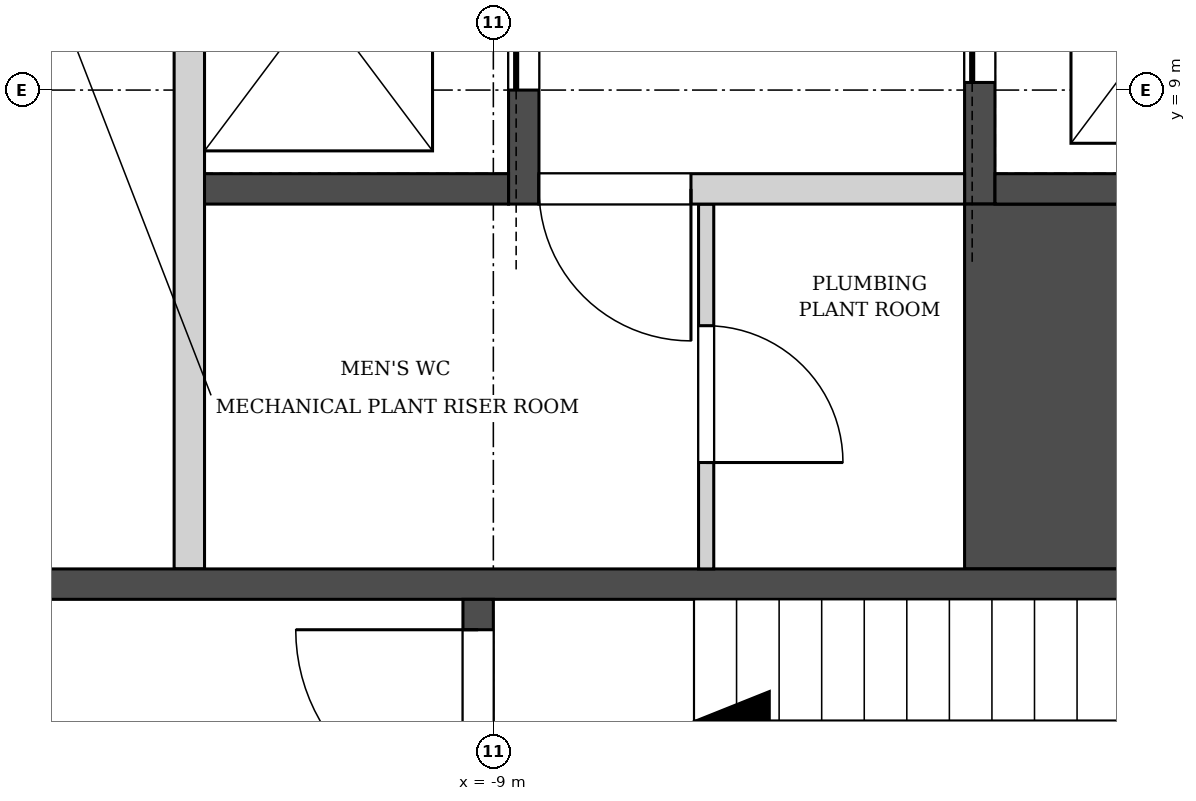
"""IFC4 building model, lengths in metres.
Left out: names, types, materials, properties, quantities, classifications, styles, units other than length and angle.
Written with IfcOpenShell. Run it as: python <this file> out.ifc"""

import sys

from ifc_helpers import new_model, si_unit, direction, frame, frame_2d, origin, place, context, subcontext, project, spatial, rectangle, extrude, element, fill, save


model = new_model("IFC4")
c1 = context("Model", 3, precision=1e-05, world=origin(), true_north=direction((0.0, 1.0)))
c2 = subcontext(c1, "Body", "Model", "MODEL_VIEW")
j1 = project(units=[si_unit("LENGTHUNIT", "METRE"), si_unit("PLANEANGLEUNIT", "RADIAN")], contexts=[c1])
p1 = place(None, origin())
s1 = spatial("IfcSite", under=j1, at=p1, CompositionType="ELEMENT")
p2 = place(p1, origin())
s2 = spatial("IfcBuilding", under=s1, at=p2, CompositionType="ELEMENT")
p3 = place(p2, frame((0.0, 0.0, 132.1)))
s3 = spatial("IfcBuildingStorey", under=s2, at=p3, CompositionType="ELEMENT", Elevation=132.1)
p4 = place(p3, frame((-4.353, 51.692, 0.0), z_axis=(0.0, 0.0, 1.0), x_axis=(-0.500000700546, -0.866024999324, 0.0)))
e1 = element("IfcWall", 1, at=p4, inside=s3, PredefinedType="SOLIDWALL", context=c2, shape_type="SweptSolid", body=[
    extrude(rectangle(XDim=50.787, YDim=0.34, at=frame_2d((25.393, 0.0))), origin(), (0.0, 0.0, 1.0), 5.0),
])
p5 = place(p4, frame((3.59, 0.0, 0.9)))
e2 = element("IfcOpeningElement", 2, at=p5, cuts=e1, PredefinedType="OPENING", context=c2, shape_type="SweptSolid", body=[
    extrude(rectangle(XDim=1.885, YDim=3.0, at=frame_2d((0.942, 1.5))), frame((0.0, 0.18, 0.0), z_axis=(0.0, -1.0, 0.0), x_axis=(1.0, 0.0, 0.0)), (0.0, 0.0, 1.0), 0.36),
])
p6 = place(p4, frame((6.59, 0.0, 0.9)))
e3 = element("IfcOpeningElement", 3, at=p6, cuts=e1, PredefinedType="OPENING", context=c2, shape_type="SweptSolid", body=[
    extrude(rectangle(XDim=1.885, YDim=3.0, at=frame_2d((0.942, 1.5))), frame((0.0, 0.18, 0.0), z_axis=(0.0, -1.0, 0.0), x_axis=(1.0, 0.0, 0.0)), (0.0, 0.0, 1.0), 0.36),
])
p7 = place(p4, frame((9.59, 0.0, 0.9)))
e4 = element("IfcOpeningElement", 4, at=p7, cuts=e1, PredefinedType="OPENING", context=c2, shape_type="SweptSolid", body=[
    extrude(rectangle(XDim=1.885, YDim=3.0, at=frame_2d((0.942, 1.5))), frame((0.0, 0.18, 0.0), z_axis=(0.0, -1.0, 0.0), x_axis=(1.0, 0.0, 0.0)), (0.0, 0.0, 1.0), 0.36),
])
p8 = place(p4, frame((12.59, 0.0, 0.9)))
e5 = element("IfcOpeningElement", 5, at=p8, cuts=e1, PredefinedType="OPENING", context=c2, shape_type="SweptSolid", body=[
    extrude(rectangle(XDim=1.885, YDim=3.0, at=frame_2d((0.942, 1.5))), frame((0.0, 0.18, 0.0), z_axis=(0.0, -1.0, 0.0), x_axis=(1.0, 0.0, 0.0)), (0.0, 0.0, 1.0), 0.36),
])
p9 = place(p4, frame((15.59, 0.0, 0.9)))
e6 = element("IfcOpeningElement", 6, at=p9, cuts=e1, PredefinedType="OPENING", context=c2, shape_type="SweptSolid", body=[
    extrude(rectangle(XDim=1.885, YDim=3.0, at=frame_2d((0.942, 1.5))), frame((0.0, 0.18, 0.0), z_axis=(0.0, -1.0, 0.0), x_axis=(1.0, 0.0, 0.0)), (0.0, 0.0, 1.0), 0.36),
])
p10 = place(p4, frame((18.59, 0.0, 0.9)))
e7 = element("IfcOpeningElement", 7, at=p10, cuts=e1, PredefinedType="OPENING", context=c2, shape_type="SweptSolid", body=[
    extrude(rectangle(XDim=1.885, YDim=3.0, at=frame_2d((0.942, 1.5))), frame((0.0, 0.18, 0.0), z_axis=(0.0, -1.0, 0.0), x_axis=(1.0, 0.0, 0.0)), (0.0, 0.0, 1.0), 0.36),
])
p11 = place(p4, frame((21.59, 0.0, 0.9)))
e8 = element("IfcOpeningElement", 8, at=p11, cuts=e1, PredefinedType="OPENING", context=c2, shape_type="SweptSolid", body=[
    extrude(rectangle(XDim=1.885, YDim=3.0, at=frame_2d((0.942, 1.5))), frame((0.0, 0.18, 0.0), z_axis=(0.0, -1.0, 0.0), x_axis=(1.0, 0.0, 0.0)), (0.0, 0.0, 1.0), 0.36),
])
p12 = place(p4, frame((24.59, 0.0, 0.9)))
e9 = element("IfcOpeningElement", 9, at=p12, cuts=e1, PredefinedType="OPENING", context=c2, shape_type="SweptSolid", body=[
    extrude(rectangle(XDim=1.885, YDim=3.0, at=frame_2d((0.942, 1.5))), frame((0.0, 0.18, 0.0), z_axis=(0.0, -1.0, 0.0), x_axis=(1.0, 0.0, 0.0)), (0.0, 0.0, 1.0), 0.36),
])
p13 = place(p4, frame((27.59, 0.0, 0.9)))
e10 = element("IfcOpeningElement", 10, at=p13, cuts=e1, PredefinedType="OPENING", context=c2, shape_type="SweptSolid", body=[
    extrude(rectangle(XDim=1.885, YDim=3.0, at=frame_2d((0.942, 1.5))), frame((0.0, 0.18, 0.0), z_axis=(0.0, -1.0, 0.0), x_axis=(1.0, 0.0, 0.0)), (0.0, 0.0, 1.0), 0.36),
])
p14 = place(p4, frame((30.59, 0.0, 0.9)))
e11 = element("IfcOpeningElement", 11, at=p14, cuts=e1, PredefinedType="OPENING", context=c2, shape_type="SweptSolid", body=[
    extrude(rectangle(XDim=1.885, YDim=3.0, at=frame_2d((0.942, 1.5))), frame((0.0, 0.18, 0.0), z_axis=(0.0, -1.0, 0.0), x_axis=(1.0, 0.0, 0.0)), (0.0, 0.0, 1.0), 0.36),
])
p15 = place(p4, frame((33.59, 0.0, 0.9)))
e12 = element("IfcOpeningElement", 12, at=p15, cuts=e1, PredefinedType="OPENING", context=c2, shape_type="SweptSolid", body=[
    extrude(rectangle(XDim=1.885, YDim=3.0, at=frame_2d((0.942, 1.5))), frame((0.0, 0.18, 0.0), z_axis=(0.0, -1.0, 0.0), x_axis=(1.0, 0.0, 0.0)), (0.0, 0.0, 1.0), 0.36),
])
p16 = place(p4, frame((36.59, 0.0, 0.9)))
e13 = element("IfcOpeningElement", 13, at=p16, cuts=e1, PredefinedType="OPENING", context=c2, shape_type="SweptSolid", body=[
    extrude(rectangle(XDim=1.885, YDim=3.0, at=frame_2d((0.942, 1.5))), frame((0.0, 0.18, 0.0), z_axis=(0.0, -1.0, 0.0), x_axis=(1.0, 0.0, 0.0)), (0.0, 0.0, 1.0), 0.36),
])
p17 = place(p4, frame((39.59, 0.0, 0.9)))
e14 = element("IfcOpeningElement", 14, at=p17, cuts=e1, PredefinedType="OPENING", context=c2, shape_type="SweptSolid", body=[
    extrude(rectangle(XDim=1.885, YDim=3.0, at=frame_2d((0.942, 1.5))), frame((0.0, 0.18, 0.0), z_axis=(0.0, -1.0, 0.0), x_axis=(1.0, 0.0, 0.0)), (0.0, 0.0, 1.0), 0.36),
])
p18 = place(p4, frame((42.59, 0.0, 0.9)))
e15 = element("IfcOpeningElement", 15, at=p18, cuts=e1, PredefinedType="OPENING", context=c2, shape_type="SweptSolid", body=[
    extrude(rectangle(XDim=1.885, YDim=3.0, at=frame_2d((0.942, 1.5))), frame((0.0, 0.18, 0.0), z_axis=(0.0, -1.0, 0.0), x_axis=(1.0, 0.0, 0.0)), (0.0, 0.0, 1.0), 0.36),
])
p19 = place(p4, frame((45.59, 0.0, 0.9)))
e16 = element("IfcOpeningElement", 16, at=p19, cuts=e1, PredefinedType="OPENING", context=c2, shape_type="SweptSolid", body=[
    extrude(rectangle(XDim=1.885, YDim=3.0, at=frame_2d((0.942, 1.5))), frame((0.0, 0.18, 0.0), z_axis=(0.0, -1.0, 0.0), x_axis=(1.0, 0.0, 0.0)), (0.0, 0.0, 1.0), 0.36),
])
p20 = place(p3, frame((-11.0, 5.85, 0.0), z_axis=(0.0, 0.0, 1.0), x_axis=(0.0, 1.0, 0.0)))
e17 = element("IfcWall", 17, at=p20, inside=s3, PredefinedType="SOLIDWALL", context=c2, shape_type="SweptSolid", body=[
    extrude(rectangle(XDim=7.4, YDim=0.2, at=frame_2d((3.7, 0.0))), origin(), (0.0, 0.0, 1.0), 5.0),
])
p21 = place(p3, frame((-8.8, 8.25, -0.4), z_axis=(0.0, 0.0, 1.0), x_axis=(0.0, 1.0, 0.0)))
e18 = element("IfcWall", 18, at=p21, inside=s3, PredefinedType="SOLIDWALL", context=c2, shape_type="SweptSolid", body=[
    extrude(rectangle(XDim=5.2, YDim=0.2, at=frame_2d((2.6, 0.0))), origin(), (0.0, 0.0, 1.0), 5.4),
])
p22 = place(p21, frame((0.75, 0.0, 0.4)))
e19 = element("IfcOpeningElement", 19, at=p22, cuts=e18, PredefinedType="OPENING", context=c2, shape_type="SweptSolid", body=[
    extrude(rectangle(XDim=1.2, YDim=2.1, at=frame_2d((0.6, 1.05))), frame((0.0, 0.11, 0.0), z_axis=(0.0, -1.0, 0.0), x_axis=(1.0, 0.0, 0.0)), (0.0, 0.0, 1.0), 0.22),
])
p23 = place(p21, frame((3.25, 0.0, 0.4)))
e20 = element("IfcOpeningElement", 20, at=p23, cuts=e18, PredefinedType="OPENING", context=c2, shape_type="SweptSolid", body=[
    extrude(rectangle(XDim=1.2, YDim=2.1, at=frame_2d((0.6, 1.05))), frame((0.0, 0.11, 0.0), z_axis=(0.0, -1.0, 0.0), x_axis=(1.0, 0.0, 0.0)), (0.0, 0.0, 1.0), 0.22),
])
p24 = place(p3, frame((-5.8, 8.25, -0.4), z_axis=(0.0, 0.0, 1.0), x_axis=(0.0, 1.0, 0.0)))
e21 = element("IfcWall", 21, at=p24, inside=s3, PredefinedType="SOLIDWALL", context=c2, shape_type="SweptSolid", body=[
    extrude(rectangle(XDim=8.0, YDim=0.2, at=frame_2d((4.0, 0.0))), origin(), (0.0, 0.0, 1.0), 5.4),
])
p25 = place(p24, frame((0.8, 0.0, 0.4)))
e22 = element("IfcOpeningElement", 22, at=p25, cuts=e21, PredefinedType="OPENING", context=c2, shape_type="SweptSolid", body=[
    extrude(rectangle(XDim=1.2, YDim=2.1, at=frame_2d((0.6, 1.05))), frame((0.0, 0.11, 0.0), z_axis=(0.0, -1.0, 0.0), x_axis=(1.0, 0.0, 0.0)), (0.0, 0.0, 1.0), 0.22),
])
p26 = place(p24, frame((3.4, 0.0, 0.4)))
e23 = element("IfcOpeningElement", 23, at=p26, cuts=e21, PredefinedType="OPENING", context=c2, shape_type="SweptSolid", body=[
    extrude(rectangle(XDim=1.2, YDim=2.1, at=frame_2d((0.6, 1.05))), frame((0.0, 0.11, 0.0), z_axis=(0.0, -1.0, 0.0), x_axis=(1.0, 0.0, 0.0)), (0.0, 0.0, 1.0), 0.22),
])
p27 = place(p24, frame((6.0, 0.0, 0.4)))
e24 = element("IfcOpeningElement", 24, at=p27, cuts=e21, PredefinedType="OPENING", context=c2, shape_type="SweptSolid", body=[
    extrude(rectangle(XDim=1.2, YDim=2.1, at=frame_2d((0.6, 1.05))), frame((0.0, 0.11, 0.0), z_axis=(0.0, -1.0, 0.0), x_axis=(1.0, 0.0, 0.0)), (0.0, 0.0, 1.0), 0.22),
])
p28 = place(p3, frame((-5.2, 5.85, -0.4), z_axis=(0.0, 0.0, 1.0), x_axis=(0.0, 1.0, 0.0)))
e25 = element("IfcWall", 25, at=p28, inside=s3, PredefinedType="SOLIDWALL", context=c2, shape_type="SweptSolid", body=[
    extrude(rectangle(XDim=2.4, YDim=1.4, at=frame_2d((1.2, 0.0))), origin(), (0.0, 0.0, 1.0), 5.4),
])
p29 = place(p3, frame((-10.9, 8.35, -0.4), z_axis=(0.0, 0.0, 1.0), x_axis=(1.0, 0.0, 0.0)))
e26 = element("IfcWall", 26, at=p29, inside=s3, PredefinedType="SOLIDWALL", context=c2, shape_type="SweptSolid", body=[
    extrude(rectangle(XDim=2.0, YDim=0.2, at=frame_2d((1.0, 0.0))), origin(), (0.0, 0.0, 1.0), 5.4),
])
p30 = place(p3, frame((-5.7, 8.35, -0.4), z_axis=(0.0, 0.0, 1.0), x_axis=(1.0, 0.0, 0.0)))
e27 = element("IfcWall", 27, at=p30, inside=s3, PredefinedType="SOLIDWALL", context=c2, shape_type="SweptSolid", body=[
    extrude(rectangle(XDim=4.2, YDim=0.2, at=frame_2d((2.1, 0.0))), origin(), (0.0, 0.0, 1.0), 5.4),
])
p31 = place(p3, frame((-12.6, 5.75, -0.4), z_axis=(0.0, 0.0, 1.0), x_axis=(1.0, 0.0, 0.0)))
e28 = element("IfcWall", 28, at=p31, inside=s3, PredefinedType="SOLIDWALL", context=c2, shape_type="SweptSolid", body=[
    extrude(rectangle(XDim=11.4, YDim=0.2, at=frame_2d((5.7, 0.0))), origin(), (0.0, 0.0, 1.0), 5.4),
])
p32 = place(p3, frame((-9.1, 2.25, -0.4), z_axis=(0.0, 0.0, 1.0), x_axis=(0.0, 1.0, 0.0)))
e29 = element("IfcWall", 29, at=p32, inside=s3, PredefinedType="SOLIDWALL", context=c2, shape_type="SweptSolid", body=[
    extrude(rectangle(XDim=3.4, YDim=0.2, at=frame_2d((1.7, 0.0))), origin(), (0.0, 0.0, 1.0), 5.4),
])
p33 = place(p32, frame((0.2, 0.0, 0.4)))
e30 = element("IfcOpeningElement", 30, at=p33, cuts=e29, PredefinedType="OPENING", context=c2, shape_type="SweptSolid", body=[
    extrude(rectangle(XDim=1.2, YDim=2.1, at=frame_2d((0.6, 1.05))), frame((0.0, 0.11, 0.0), z_axis=(0.0, -1.0, 0.0), x_axis=(1.0, 0.0, 0.0)), (0.0, 0.0, 1.0), 0.22),
])
p34 = place(p32, frame((2.0, 0.0, 0.4)))
e31 = element("IfcOpeningElement", 31, at=p34, cuts=e29, PredefinedType="OPENING", context=c2, shape_type="SweptSolid", body=[
    extrude(rectangle(XDim=1.2, YDim=2.1, at=frame_2d((0.6, 1.05))), frame((0.0, 0.11, 0.0), z_axis=(0.0, -1.0, 0.0), x_axis=(1.0, 0.0, 0.0)), (0.0, 0.0, 1.0), 0.22),
])
p35 = place(p3, frame((-7.6, 5.85, 0.0), z_axis=(0.0, 0.0, 1.0), x_axis=(0.0, 1.0, 0.0)))
e32 = element("IfcWall", 32, at=p35, inside=s3, PredefinedType="PARTITIONING", context=c2, shape_type="SweptSolid", body=[
    extrude(rectangle(XDim=2.4, YDim=0.1, at=frame_2d((1.2, 0.0))), origin(), (0.0, 0.0, 1.0), 5.0),
])
p36 = place(p35, frame((0.7, 0.0, 0.0)))
e33 = element("IfcOpeningElement", 33, at=p36, cuts=e32, PredefinedType="OPENING", context=c2, shape_type="SweptSolid", body=[
    extrude(rectangle(XDim=0.9, YDim=2.1, at=frame_2d((0.45, 1.05))), frame((0.0, 0.06, 0.0), z_axis=(0.0, -1.0, 0.0), x_axis=(1.0, 0.0, 0.0)), (0.0, 0.0, 1.0), 0.12),
])
p37 = place(p3, frame((-8.7, 8.35, 0.0), z_axis=(0.0, 0.0, 1.0), x_axis=(1.0, 0.0, 0.0)))
e34 = element("IfcWall", 34, at=p37, inside=s3, PredefinedType="SOLIDWALL", context=c2, shape_type="SweptSolid", body=[
    extrude(rectangle(XDim=2.8, YDim=0.2, at=frame_2d((1.4, 0.0))), origin(), (0.0, 0.0, 1.0), 5.0),
])
p38 = place(p37, origin())
e35 = element("IfcOpeningElement", 35, at=p38, cuts=e34, PredefinedType="OPENING", context=c2, shape_type="SweptSolid", body=[
    extrude(rectangle(XDim=1.0, YDim=2.1, at=frame_2d((0.5, 1.05))), frame((0.0, 0.11, 0.0), z_axis=(0.0, -1.0, 0.0), x_axis=(1.0, 0.0, 0.0)), (0.0, 0.0, 1.0), 0.22),
])
p39 = place(p22, origin())
e36 = element("IfcDoor", 36, at=p39, inside=s3, OperationType="SLIDING_TO_LEFT", PredefinedType="DOOR", context=c2, shape_type="SweptSolid", body=[
    extrude(rectangle(XDim=1.2, YDim=2.1, at=frame_2d((0.6, 1.05))), frame((0.0, 0.025, 0.0), z_axis=(0.0, -1.0, 0.0), x_axis=(1.0, 0.0, 0.0)), (0.0, 0.0, 1.0), 0.05),
])
fill(e19, e36)
p40 = place(p25, origin())
e37 = element("IfcDoor", 37, at=p40, inside=s3, OperationType="SLIDING_TO_LEFT", PredefinedType="DOOR", context=c2, shape_type="SweptSolid", body=[
    extrude(rectangle(XDim=1.2, YDim=2.1, at=frame_2d((0.6, 1.05))), frame((0.0, 0.025, 0.0), z_axis=(0.0, -1.0, 0.0), x_axis=(1.0, 0.0, 0.0)), (0.0, 0.0, 1.0), 0.05),
])
fill(e22, e37)
p41 = place(p38, frame((1.0, 0.0, 0.0), z_axis=(0.0, 0.0, 1.0), x_axis=(-1.0, 0.0, 0.0)))
e38 = element("IfcDoor", 38, at=p41, inside=s3, OperationType="SINGLE_SWING_LEFT", PredefinedType="DOOR", context=c2, shape_type="SweptSolid", body=[
    extrude(rectangle(XDim=1.0, YDim=2.1, at=frame_2d((0.5, 1.05))), frame((0.0, 0.025, 0.0), z_axis=(0.0, -1.0, 0.0), x_axis=(1.0, 0.0, 0.0)), (0.0, 0.0, 1.0), 0.05),
])
fill(e35, e38)
p42 = place(p36, frame((0.9, 0.0, 0.0), z_axis=(0.0, 0.0, 1.0), x_axis=(-1.0, 0.0, 0.0)))
e39 = element("IfcDoor", 39, at=p42, inside=s3, OperationType="SINGLE_SWING_RIGHT", PredefinedType="DOOR", context=c2, shape_type="SweptSolid", body=[
    extrude(rectangle(XDim=0.9, YDim=2.1, at=frame_2d((0.45, 1.05))), frame((0.0, 0.025, 0.0), z_axis=(0.0, -1.0, 0.0), x_axis=(1.0, 0.0, 0.0)), (0.0, 0.0, 1.0), 0.05),
])
fill(e33, e39)
p43 = place(p34, origin())
e40 = element("IfcDoor", 40, at=p43, inside=s3, OperationType="SINGLE_SWING_RIGHT", PredefinedType="DOOR", context=c2, shape_type="SweptSolid", body=[
    extrude(rectangle(XDim=1.2, YDim=2.1, at=frame_2d((0.6, 1.05))), frame((0.0, 0.025, 0.0), z_axis=(0.0, -1.0, 0.0), x_axis=(1.0, 0.0, 0.0)), (0.0, 0.0, 1.0), 0.05),
])
fill(e31, e40)
save(model, sys.argv[1])
